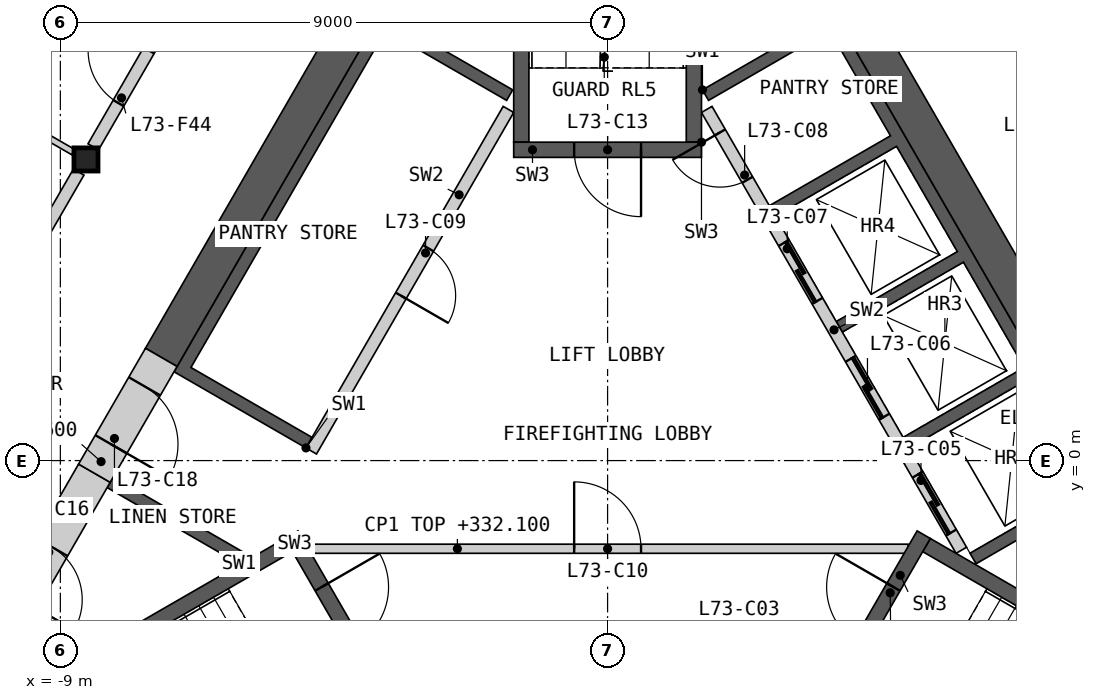
"""IFC4 building model, lengths in metres.
Left out: names, types, materials, properties, quantities, classifications, styles, units other than length and angle.
Written with IfcOpenShell. Run it as: python <this file> out.ifc"""

import sys

from ifc_helpers import new_model, si_unit, direction, frame, frame_2d, origin, origin_2d, place, context, subcontext, project, spatial, polyline, rectangle, i_section, outline, extrude, element, fill, save


model = new_model("IFC4")
c1 = context("Model", 3, precision=1e-05, world=origin(), true_north=direction((0.0, 1.0)))
c2 = subcontext(c1, "Body", "Model", "MODEL_VIEW")
j1 = project(units=[si_unit("LENGTHUNIT", "METRE"), si_unit("PLANEANGLEUNIT", "RADIAN")], contexts=[c1])
p1 = place(None, origin())
s1 = spatial("IfcSite", under=j1, at=p1, CompositionType="ELEMENT")
p2 = place(p1, origin())
s2 = spatial("IfcBuilding", under=s1, at=p2, CompositionType="ELEMENT")
p3 = place(p2, frame((0.0, 0.0, 329.0)))
s3 = spatial("IfcBuildingStorey", under=s2, at=p3, CompositionType="ELEMENT", Elevation=329.0)
p4 = place(p3, frame((-8.578, 4.953, 0.0), z_axis=(0.0, 0.0, 1.0), x_axis=(1.0, 0.0, 0.0)))
e1 = element("IfcColumn", 1, at=p4, inside=s3, PredefinedType="COLUMN", context=c2, shape_type="SweptSolid", body=[
    extrude(i_section(OverallWidth=0.396, OverallDepth=0.381, WebThickness=0.019, FlangeThickness=0.03, at=origin_2d()), origin(), (0.0, 0.0, 1.0), 3.4),
])
p5 = place(p3, origin())
e2 = element("IfcWall", 2, at=p5, inside=s3, PredefinedType="SHEAR", context=c2, shape_type="SweptSolid", body=[
    extrude(outline(polyline([(1.561, 6.097), (3.731, 7.35), (8.231, -0.444), (6.061, -1.697), (5.96, -1.524), (7.952, -0.374), (6.952, 1.358), (4.96, 0.208), (4.861, 0.381), (6.852, 1.531), (5.852, 3.263), (3.861, 2.113), (3.76, 2.287), (5.752, 3.437), (4.752, 5.169), (2.76, 4.019), (2.66, 4.192), (4.652, 5.342), (3.652, 7.074), (1.66, 5.924), (1.561, 6.097)])), origin(), (0.0, 0.0, 1.0), 3.1),
])
p6 = place(p3, frame((5.817, -1.476, 0.0), z_axis=(0.0, 0.0, 1.0), x_axis=(-0.500002616675, 0.866023893041, 0.0)))
e3 = element("IfcWall", 3, at=p6, inside=s3, PredefinedType="SOLIDWALL", context=c2, shape_type="SweptSolid", body=[
    extrude(rectangle(XDim=8.373, YDim=0.2, at=frame_2d((4.187, 0.0))), origin(), (0.0, 0.0, 1.0), 3.1),
])
p7 = place(p6, frame((0.337, 0.0, 0.0)))
e4 = element("IfcOpeningElement", 4, at=p7, cuts=e3, PredefinedType="OPENING", context=c2, shape_type="SweptSolid", body=[
    extrude(rectangle(XDim=1.1, YDim=2.1, at=frame_2d((0.55, 1.05))), frame((0.0, 0.11, 0.0), z_axis=(0.0, -1.0, 0.0), x_axis=(1.0, 0.0, 0.0)), (0.0, 0.0, 1.0), 0.22),
])
p8 = place(p6, frame((2.537, 0.0, 0.0)))
e5 = element("IfcOpeningElement", 5, at=p8, cuts=e3, PredefinedType="OPENING", context=c2, shape_type="SweptSolid", body=[
    extrude(rectangle(XDim=1.1, YDim=2.1, at=frame_2d((0.55, 1.05))), frame((0.0, 0.11, 0.0), z_axis=(0.0, -1.0, 0.0), x_axis=(1.0, 0.0, 0.0)), (0.0, 0.0, 1.0), 0.22),
])
p9 = place(p6, frame((4.737, 0.0, 0.0)))
e6 = element("IfcOpeningElement", 6, at=p9, cuts=e3, PredefinedType="OPENING", context=c2, shape_type="SweptSolid", body=[
    extrude(rectangle(XDim=1.1, YDim=2.1, at=frame_2d((0.55, 1.05))), frame((0.0, 0.11, 0.0), z_axis=(0.0, -1.0, 0.0), x_axis=(1.0, 0.0, 0.0)), (0.0, 0.0, 1.0), 0.22),
])
p10 = place(p6, frame((7.037, 0.0, 0.0)))
e7 = element("IfcOpeningElement", 7, at=p10, cuts=e3, PredefinedType="OPENING", context=c2, shape_type="SweptSolid", body=[
    extrude(rectangle(XDim=0.9, YDim=2.1, at=frame_2d((0.45, 1.05))), frame((0.0, 0.11, 0.0), z_axis=(0.0, -1.0, 0.0), x_axis=(1.0, 0.0, 0.0)), (0.0, 0.0, 1.0), 0.22),
])
p11 = place(p3, origin())
e8 = element("IfcWall", 8, at=p11, inside=s3, PredefinedType="SHEAR", context=c2, shape_type="SweptSolid", body=[
    extrude(outline(polyline([(-6.061, -1.697), (-8.231, -0.444), (-8.131, -0.271), (-5.96, -1.524), (-6.061, -1.697)])), origin(), (0.0, 0.0, 1.0), 3.1),
])
p12 = place(p3, origin())
e9 = element("IfcWall", 9, at=p12, inside=s3, PredefinedType="SHEAR", context=c2, shape_type="SweptSolid", body=[
    extrude(outline(polyline([(-4.96, 0.208), (-7.131, 1.461), (-3.731, 7.35), (-1.561, 6.097), (-1.66, 5.924), (-3.652, 7.074), (-6.852, 1.531), (-4.861, 0.381), (-4.96, 0.208)])), origin(), (0.0, 0.0, 1.0), 3.1),
])
p13 = place(p3, frame((-1.631, 5.776, 0.0), z_axis=(0.0, 0.0, 1.0), x_axis=(-0.499992876559, -0.866029516466, 0.0)))
e10 = element("IfcWall", 10, at=p13, inside=s3, PredefinedType="SOLIDWALL", context=c2, shape_type="SweptSolid", body=[
    extrude(rectangle(XDim=6.486, YDim=0.2, at=frame_2d((3.243, 0.0))), origin(), (0.0, 0.0, 1.0), 3.1),
])
p14 = place(p13, frame((2.637, 0.0, 0.0)))
e11 = element("IfcOpeningElement", 11, at=p14, cuts=e10, PredefinedType="OPENING", context=c2, shape_type="SweptSolid", body=[
    extrude(rectangle(XDim=0.9, YDim=2.1, at=frame_2d((0.45, 1.05))), frame((0.0, 0.11, 0.0), z_axis=(0.0, -1.0, 0.0), x_axis=(1.0, 0.0, 0.0)), (0.0, 0.0, 1.0), 0.22),
])
p15 = place(p3, frame((-4.941, -1.45, 0.0), z_axis=(0.0, 0.0, 1.0), x_axis=(1.0, 0.0, 0.0)))
e12 = element("IfcWall", 12, at=p15, inside=s3, PredefinedType="PARTITIONING", context=c2, shape_type="SweptSolid", body=[
    extrude(rectangle(XDim=9.882, YDim=0.15, at=frame_2d((4.941, 0.0))), origin(), (0.0, 0.0, 1.0), 3.1),
])
p16 = place(p15, frame((4.391, 0.0, 0.0)))
e13 = element("IfcOpeningElement", 13, at=p16, cuts=e12, PredefinedType="OPENING", context=c2, shape_type="SweptSolid", body=[
    extrude(rectangle(XDim=1.1, YDim=2.1, at=frame_2d((0.55, 1.05))), frame((0.0, 0.085, 0.0), z_axis=(0.0, -1.0, 0.0), x_axis=(1.0, 0.0, 0.0)), (0.0, 0.0, 1.0), 0.17),
])
p17 = place(p3, origin())
e14 = element("IfcWall", 14, at=p17, inside=s3, PredefinedType="SHEAR", context=c2, shape_type="SweptSolid", body=[
    extrude(outline(polyline([(-5.307, -1.281), (-10.374, -4.206), (-10.032, -4.298), (-5.182, -1.498), (-5.307, -1.281)])), origin(), (0.0, 0.0, 1.0), 3.1),
])
p18 = place(p3, frame((-5.199, -1.219, 0.0), z_axis=(0.0, 0.0, 1.0), x_axis=(0.499982516597, -0.866035497597, 0.0)))
e15 = element("IfcWall", 15, at=p18, inside=s3, PredefinedType="SHEAR", context=c2, shape_type="SweptSolid", body=[
    extrude(rectangle(XDim=3.088, YDim=0.25, at=frame_2d((1.544, 0.0))), origin(), (0.0, 0.0, 1.0), 3.1),
])
p19 = place(p18, frame((0.994, 0.0, 0.0)))
e16 = element("IfcOpeningElement", 16, at=p19, cuts=e15, PredefinedType="OPENING", context=c2, shape_type="SweptSolid", body=[
    extrude(rectangle(XDim=1.1, YDim=2.1, at=frame_2d((0.55, 1.05))), frame((0.0, 0.135, 0.0), z_axis=(0.0, -1.0, 0.0), x_axis=(1.0, 0.0, 0.0)), (0.0, 0.0, 1.0), 0.27),
])
p20 = place(p3, origin())
e17 = element("IfcWall", 17, at=p20, inside=s3, PredefinedType="SHEAR", context=c2, shape_type="SweptSolid", body=[
    extrude(outline(polyline([(10.032, -4.298), (10.374, -4.206), (5.307, -1.281), (5.182, -1.498), (10.032, -4.298)])), origin(), (0.0, 0.0, 1.0), 3.1),
])
p21 = place(p3, frame((3.655, -3.893, 0.0), z_axis=(0.0, 0.0, 1.0), x_axis=(0.499982516597, 0.866035497597, 0.0)))
e18 = element("IfcWall", 18, at=p21, inside=s3, PredefinedType="SHEAR", context=c2, shape_type="SweptSolid", body=[
    extrude(rectangle(XDim=3.088, YDim=0.25, at=frame_2d((1.544, 0.0))), origin(), (0.0, 0.0, 1.0), 3.1),
])
p22 = place(p21, frame((0.994, 0.0, 0.0)))
e19 = element("IfcOpeningElement", 19, at=p22, cuts=e18, PredefinedType="OPENING", context=c2, shape_type="SweptSolid", body=[
    extrude(rectangle(XDim=1.1, YDim=2.1, at=frame_2d((0.55, 1.05))), frame((0.0, 0.135, 0.0), z_axis=(0.0, -1.0, 0.0), x_axis=(1.0, 0.0, 0.0)), (0.0, 0.0, 1.0), 0.27),
])
p23 = place(p3, origin())
e20 = element("IfcWall", 20, at=p23, inside=s3, PredefinedType="SHEAR", context=c2, shape_type="SweptSolid", body=[
    extrude(outline(polyline([(1.544, 5.237), (1.544, 11.087), (1.294, 10.837), (1.294, 5.237), (1.544, 5.237)])), origin(), (0.0, 0.0, 1.0), 3.1),
])
p24 = place(p3, origin())
e21 = element("IfcWall", 21, at=p24, inside=s3, PredefinedType="SHEAR", context=c2, shape_type="SweptSolid", body=[
    extrude(outline(polyline([(-1.294, 10.837), (-1.544, 11.087), (-1.544, 5.237), (-1.294, 5.237), (-1.294, 10.837)])), origin(), (0.0, 0.0, 1.0), 3.1),
])
p25 = place(p3, frame((1.544, 5.112, 0.0), z_axis=(0.0, 0.0, 1.0), x_axis=(-1.0, 0.0, 0.0)))
e22 = element("IfcWall", 22, at=p25, inside=s3, PredefinedType="SHEAR", context=c2, shape_type="SweptSolid", body=[
    extrude(rectangle(XDim=3.088, YDim=0.25, at=frame_2d((1.544, 0.0))), origin(), (0.0, 0.0, 1.0), 3.1),
])
p26 = place(p25, frame((0.994, 0.0, 0.0)))
e23 = element("IfcOpeningElement", 23, at=p26, cuts=e22, PredefinedType="OPENING", context=c2, shape_type="SweptSolid", body=[
    extrude(rectangle(XDim=1.1, YDim=2.1, at=frame_2d((0.55, 1.05))), frame((0.0, 0.135, 0.0), z_axis=(0.0, -1.0, 0.0), x_axis=(1.0, 0.0, 0.0)), (0.0, 0.0, 1.0), 0.27),
])
p27 = place(p3, frame((8.686, -0.634, 0.0), z_axis=(0.0, 0.0, 1.0), x_axis=(-0.500004601921, 0.866022746848, 0.0)))
e24 = element("IfcWall", 24, at=p27, inside=s3, PredefinedType="SHEAR", context=c2, shape_type="SweptSolid", body=[
    extrude(rectangle(XDim=16.853, YDim=0.6, at=frame_2d((8.426, 0.0))), origin(), (0.0, 0.0, 1.0), 3.1),
])
p28 = place(p3, frame((-3.794, 7.84, 0.0), z_axis=(0.0, 0.0, 1.0), x_axis=(-0.499974747889, -0.866039982607, 0.0)))
e25 = element("IfcWall", 25, at=p28, inside=s3, PredefinedType="SHEAR", context=c2, shape_type="SweptSolid", body=[
    extrude(rectangle(XDim=7.092, YDim=0.6, at=frame_2d((3.546, 0.0))), origin(), (0.0, 0.0, 1.0), 3.1),
])
p29 = place(p3, frame((-8.44, -0.208, 0.0), z_axis=(0.0, 0.0, 1.0), x_axis=(-0.499997052475, -0.866027105532, 0.0)))
e26 = element("IfcWall", 26, at=p29, inside=s3, PredefinedType="SHEAR", context=c2, shape_type="SweptSolid", body=[
    extrude(rectangle(XDim=3.001, YDim=0.6, at=frame_2d((1.501, 0.0))), origin(), (0.0, 0.0, 1.0), 3.1),
])
p30 = place(p29, frame((1.4, 0.0, 0.0)))
e27 = element("IfcOpeningElement", 27, at=p30, cuts=e26, PredefinedType="OPENING", context=c2, shape_type="SweptSolid", body=[
    extrude(rectangle(XDim=1.0, YDim=2.1, at=frame_2d((0.5, 1.05))), frame((0.0, 0.31, 0.0), z_axis=(0.0, -1.0, 0.0), x_axis=(1.0, 0.0, 0.0)), (0.0, 0.0, 1.0), 0.62),
])
p31 = place(p3, frame((-7.34, 1.698, 0.0), z_axis=(0.0, 0.0, 1.0), x_axis=(-0.50002983664, -0.866008176907, 0.0)))
e28 = element("IfcWall", 28, at=p31, inside=s3, PredefinedType="SHEAR", context=c2, shape_type="SweptSolid", body=[
    extrude(rectangle(XDim=2.2, YDim=0.6, at=frame_2d((1.1, 0.0))), origin(), (0.0, 0.0, 1.0), 3.1),
])
p32 = place(p31, frame((0.55, 0.0, 0.0)))
e29 = element("IfcOpeningElement", 29, at=p32, cuts=e28, PredefinedType="OPENING", context=c2, shape_type="SweptSolid", body=[
    extrude(rectangle(XDim=1.1, YDim=2.1, at=frame_2d((0.55, 1.05))), frame((0.0, 0.31, 0.0), z_axis=(0.0, -1.0, 0.0), x_axis=(1.0, 0.0, 0.0)), (0.0, 0.0, 1.0), 0.62),
])
p33 = place(p3, frame((4.409, 12.174, 0.0), z_axis=(0.0, 0.0, 1.0), x_axis=(0.499984266882, -0.866034487114, 0.0)))
e30 = element("IfcWall", 30, at=p33, inside=s3, PredefinedType="PARTITIONING", context=c2, shape_type="SweptSolid", body=[
    extrude(rectangle(XDim=8.099, YDim=0.2, at=frame_2d((4.049, 0.0))), origin(), (0.0, 0.0, 1.0), 3.1),
])
p34 = place(p33, frame((6.269, 0.0, 0.0)))
e31 = element("IfcOpeningElement", 31, at=p34, cuts=e30, PredefinedType="OPENING", context=c2, shape_type="SweptSolid", body=[
    extrude(rectangle(XDim=1.0, YDim=2.1, at=frame_2d((0.5, 1.05))), frame((0.0, 0.11, 0.0), z_axis=(0.0, -1.0, 0.0), x_axis=(1.0, 0.0, 0.0)), (0.0, 0.0, 1.0), 0.22),
])
p35 = place(p33, frame((1.164, 0.0, 0.0)))
e32 = element("IfcOpeningElement", 32, at=p35, cuts=e30, PredefinedType="OPENING", context=c2, shape_type="SweptSolid", body=[
    extrude(rectangle(XDim=1.0, YDim=2.1, at=frame_2d((0.5, 1.05))), frame((0.0, 0.11, 0.0), z_axis=(0.0, -1.0, 0.0), x_axis=(1.0, 0.0, 0.0)), (0.0, 0.0, 1.0), 0.22),
])
p36 = place(p3, frame((-8.458, 5.16, 0.0), z_axis=(0.0, 0.0, 1.0), x_axis=(0.499984266882, 0.866034487114, 0.0)))
e33 = element("IfcWall", 33, at=p36, inside=s3, PredefinedType="PARTITIONING", context=c2, shape_type="SweptSolid", body=[
    extrude(rectangle(XDim=8.099, YDim=0.2, at=frame_2d((4.049, 0.0))), origin(), (0.0, 0.0, 1.0), 3.1),
])
p37 = place(p36, frame((5.935, 0.0, 0.0)))
e34 = element("IfcOpeningElement", 34, at=p37, cuts=e33, PredefinedType="OPENING", context=c2, shape_type="SweptSolid", body=[
    extrude(rectangle(XDim=1.0, YDim=2.1, at=frame_2d((0.5, 1.05))), frame((0.0, 0.11, 0.0), z_axis=(0.0, -1.0, 0.0), x_axis=(1.0, 0.0, 0.0)), (0.0, 0.0, 1.0), 0.22),
])
p38 = place(p36, frame((0.83, 0.0, 0.0)))
e35 = element("IfcOpeningElement", 35, at=p38, cuts=e33, PredefinedType="OPENING", context=c2, shape_type="SweptSolid", body=[
    extrude(rectangle(XDim=1.0, YDim=2.1, at=frame_2d((0.5, 1.05))), frame((0.0, 0.11, 0.0), z_axis=(0.0, -1.0, 0.0), x_axis=(1.0, 0.0, 0.0)), (0.0, 0.0, 1.0), 0.22),
])
p39 = place(p3, frame((-12.748, -2.269, 0.0), z_axis=(0.0, 0.0, 1.0), x_axis=(0.499984266882, 0.866034487114, 0.0)))
e36 = element("IfcWall", 36, at=p39, inside=s3, PredefinedType="PARTITIONING", context=c2, shape_type="SweptSolid", body=[
    extrude(rectangle(XDim=8.099, YDim=0.2, at=frame_2d((4.049, 0.0))), origin(), (0.0, 0.0, 1.0), 3.1),
])
p40 = place(p39, frame((1.164, 0.0, 0.0)))
e37 = element("IfcOpeningElement", 37, at=p40, cuts=e36, PredefinedType="OPENING", context=c2, shape_type="SweptSolid", body=[
    extrude(rectangle(XDim=1.0, YDim=2.1, at=frame_2d((0.5, 1.05))), frame((0.0, 0.11, 0.0), z_axis=(0.0, -1.0, 0.0), x_axis=(1.0, 0.0, 0.0)), (0.0, 0.0, 1.0), 0.22),
])
p41 = place(p3, frame((-19.615, 11.325, 0.0), z_axis=(0.0, 0.0, 1.0), x_axis=(0.86602139559, -0.500006942333, 0.0)))
e38 = element("IfcWall", 38, at=p41, inside=s3, PredefinedType="PARTITIONING", context=c2, shape_type="SweptSolid", body=[
    extrude(rectangle(XDim=12.505, YDim=0.1, at=frame_2d((6.252, 0.0))), origin(), (0.0, 0.0, 1.0), 2.33),
])
p42 = place(p41, frame((6.28, 0.0, 0.0)))
e39 = element("IfcOpeningElement", 39, at=p42, cuts=e38, PredefinedType="OPENING", context=c2, shape_type="SweptSolid", body=[
    extrude(rectangle(XDim=0.95, YDim=2.1, at=frame_2d((0.475, 1.05))), frame((0.0, 0.06, 0.0), z_axis=(0.0, -1.0, 0.0), x_axis=(1.0, 0.0, 0.0)), (0.0, 0.0, 1.0), 0.12),
])
p43 = place(p7, origin())
e40 = element("IfcDoor", 40, at=p43, inside=s3, OperationType="SLIDING_TO_LEFT", PredefinedType="DOOR", context=c2, shape_type="SweptSolid", body=[
    extrude(rectangle(XDim=1.1, YDim=2.1, at=frame_2d((0.55, 1.05))), frame((0.0, 0.025, 0.0), z_axis=(0.0, -1.0, 0.0), x_axis=(1.0, 0.0, 0.0)), (0.0, 0.0, 1.0), 0.05),
])
fill(e4, e40)
p44 = place(p8, origin())
e41 = element("IfcDoor", 41, at=p44, inside=s3, OperationType="SLIDING_TO_LEFT", PredefinedType="DOOR", context=c2, shape_type="SweptSolid", body=[
    extrude(rectangle(XDim=1.1, YDim=2.1, at=frame_2d((0.55, 1.05))), frame((0.0, 0.025, 0.0), z_axis=(0.0, -1.0, 0.0), x_axis=(1.0, 0.0, 0.0)), (0.0, 0.0, 1.0), 0.05),
])
fill(e5, e41)
p45 = place(p9, origin())
e42 = element("IfcDoor", 42, at=p45, inside=s3, OperationType="SLIDING_TO_LEFT", PredefinedType="DOOR", context=c2, shape_type="SweptSolid", body=[
    extrude(rectangle(XDim=1.1, YDim=2.1, at=frame_2d((0.55, 1.05))), frame((0.0, 0.025, 0.0), z_axis=(0.0, -1.0, 0.0), x_axis=(1.0, 0.0, 0.0)), (0.0, 0.0, 1.0), 0.05),
])
fill(e6, e42)
p46 = place(p10, origin())
e43 = element("IfcDoor", 43, at=p46, inside=s3, OperationType="SINGLE_SWING_RIGHT", PredefinedType="DOOR", context=c2, shape_type="SweptSolid", body=[
    extrude(rectangle(XDim=0.9, YDim=2.1, at=frame_2d((0.45, 1.05))), frame((0.0, 0.025, 0.0), z_axis=(0.0, -1.0, 0.0), x_axis=(1.0, 0.0, 0.0)), (0.0, 0.0, 1.0), 0.05),
])
fill(e7, e43)
p47 = place(p14, origin())
e44 = element("IfcDoor", 44, at=p47, inside=s3, OperationType="SINGLE_SWING_RIGHT", PredefinedType="DOOR", context=c2, shape_type="SweptSolid", body=[
    extrude(rectangle(XDim=0.9, YDim=2.1, at=frame_2d((0.45, 1.05))), frame((0.0, 0.025, 0.0), z_axis=(0.0, -1.0, 0.0), x_axis=(1.0, 0.0, 0.0)), (0.0, 0.0, 1.0), 0.05),
])
fill(e11, e44)
p48 = place(p16, origin())
e45 = element("IfcDoor", 45, at=p48, inside=s3, OperationType="SINGLE_SWING_LEFT", PredefinedType="DOOR", context=c2, shape_type="SweptSolid", body=[
    extrude(rectangle(XDim=1.1, YDim=2.1, at=frame_2d((0.55, 1.05))), frame((0.0, 0.025, 0.0), z_axis=(0.0, -1.0, 0.0), x_axis=(1.0, 0.0, 0.0)), (0.0, 0.0, 1.0), 0.05),
])
fill(e13, e45)
p49 = place(p19, origin())
e46 = element("IfcDoor", 46, at=p49, inside=s3, OperationType="SINGLE_SWING_LEFT", PredefinedType="DOOR", context=c2, shape_type="SweptSolid", body=[
    extrude(rectangle(XDim=1.1, YDim=2.1, at=frame_2d((0.55, 1.05))), frame((0.0, 0.025, 0.0), z_axis=(0.0, -1.0, 0.0), x_axis=(1.0, 0.0, 0.0)), (0.0, 0.0, 1.0), 0.05),
])
fill(e16, e46)
p50 = place(p22, origin())
e47 = element("IfcDoor", 47, at=p50, inside=s3, OperationType="SINGLE_SWING_RIGHT", PredefinedType="DOOR", context=c2, shape_type="SweptSolid", body=[
    extrude(rectangle(XDim=1.1, YDim=2.1, at=frame_2d((0.55, 1.05))), frame((0.0, 0.025, 0.0), z_axis=(0.0, -1.0, 0.0), x_axis=(1.0, 0.0, 0.0)), (0.0, 0.0, 1.0), 0.05),
])
fill(e19, e47)
p51 = place(p26, origin())
e48 = element("IfcDoor", 48, at=p51, inside=s3, OperationType="SINGLE_SWING_LEFT", PredefinedType="DOOR", context=c2, shape_type="SweptSolid", body=[
    extrude(rectangle(XDim=1.1, YDim=2.1, at=frame_2d((0.55, 1.05))), frame((0.0, 0.025, 0.0), z_axis=(0.0, -1.0, 0.0), x_axis=(1.0, 0.0, 0.0)), (0.0, 0.0, 1.0), 0.05),
])
fill(e23, e48)
p52 = place(p30, origin())
e49 = element("IfcDoor", 49, at=p52, inside=s3, OperationType="SINGLE_SWING_RIGHT", PredefinedType="DOOR", context=c2, shape_type="SweptSolid", body=[
    extrude(rectangle(XDim=1.0, YDim=2.1, at=frame_2d((0.5, 1.05))), frame((0.0, 0.055, 0.0), z_axis=(0.0, -1.0, 0.0), x_axis=(1.0, 0.0, 0.0)), (0.0, 0.0, 1.0), 0.05),
])
fill(e27, e49)
p53 = place(p32, origin())
e50 = element("IfcDoor", 50, at=p53, inside=s3, OperationType="SINGLE_SWING_RIGHT", PredefinedType="DOOR", context=c2, shape_type="SweptSolid", body=[
    extrude(rectangle(XDim=1.1, YDim=2.1, at=frame_2d((0.55, 1.05))), frame((0.0, 0.055, 0.0), z_axis=(0.0, -1.0, 0.0), x_axis=(1.0, 0.0, 0.0)), (0.0, 0.0, 1.0), 0.05),
])
fill(e29, e50)
p54 = place(p38, origin())
e51 = element("IfcDoor", 51, at=p54, inside=s3, OperationType="SINGLE_SWING_RIGHT", PredefinedType="DOOR", context=c2, shape_type="SweptSolid", body=[
    extrude(rectangle(XDim=1.0, YDim=2.1, at=frame_2d((0.5, 1.05))), frame((0.0, 0.025, 0.0), z_axis=(0.0, -1.0, 0.0), x_axis=(1.0, 0.0, 0.0)), (0.0, 0.0, 1.0), 0.05),
])
fill(e35, e51)
save(model, sys.argv[1])
